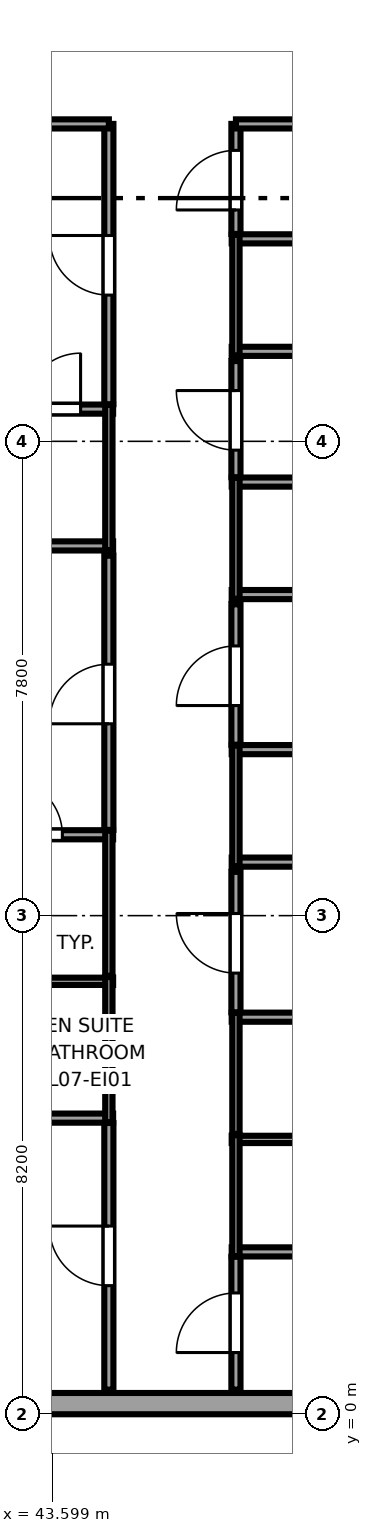
"""IFC4 building model, lengths in metres.
Left out: names, types, materials, properties, quantities, classifications, styles, units other than length and angle.
Written with IfcOpenShell. Run it as: python <this file> out.ifc"""

import sys

from ifc_helpers import new_model, si_unit, direction, frame, frame_2d, origin, place, context, subcontext, project, spatial, rectangle, extrude, source, transform, mapped, element, fill, save


model = new_model("IFC4")
c1 = context("Model", 3, precision=1e-05, world=origin(), true_north=direction((0.0, 1.0)))
c2 = subcontext(c1, "Body", "Model", "MODEL_VIEW")
j1 = project(units=[si_unit("LENGTHUNIT", "METRE"), si_unit("PLANEANGLEUNIT", "RADIAN")], contexts=[c1])
p1 = place(None, origin())
s1 = spatial("IfcSite", under=j1, at=p1, CompositionType="ELEMENT")
p2 = place(p1, origin())
s2 = spatial("IfcBuilding", under=s1, at=p2, CompositionType="ELEMENT")
p3 = place(p2, frame((0.0, 0.0, 35.55)))
s3 = spatial("IfcBuildingStorey", under=s2, at=p3, CompositionType="ELEMENT", Elevation=35.55)
p4 = place(p3, frame((34.375, 0.175, 0.0), z_axis=(0.0, 0.0, 1.0), x_axis=(1.0, 0.0, 0.0)))
e1 = element("IfcWall", 1, at=p4, inside=s3, PredefinedType="SOLIDWALL", context=c2, shape_type="SweptSolid", body=[
    extrude(rectangle(XDim=18.008, YDim=0.35, at=frame_2d((9.004, 0.0))), origin(), (0.0, 0.0, 1.0), 3.37),
])
p5 = place(p4, frame((1.726, 0.0, 0.68)))
e2 = element("IfcOpeningElement", 2, at=p5, cuts=e1, PredefinedType="OPENING", context=c2, shape_type="SweptSolid", body=[
    extrude(rectangle(XDim=1.95, YDim=1.82, at=frame_2d((0.975, 0.91))), frame((0.0, 0.185, 0.0), z_axis=(0.0, -1.0, 0.0), x_axis=(1.0, 0.0, 0.0)), (0.0, 0.0, 1.0), 0.37),
])
p6 = place(p4, frame((15.725, 0.0, 0.62)))
e3 = element("IfcOpeningElement", 3, at=p6, cuts=e1, PredefinedType="OPENING", context=c2, shape_type="SweptSolid", body=[
    extrude(rectangle(XDim=1.5, YDim=1.55, at=frame_2d((0.75, 0.775))), frame((0.0, 0.185, 0.0), z_axis=(0.0, -1.0, 0.0), x_axis=(1.0, 0.0, 0.0)), (0.0, 0.0, 1.0), 0.37),
])
p7 = place(p3, frame((42.01, 4.87, 0.0), z_axis=(0.0, 0.0, 1.0), x_axis=(1.0, 0.0, 0.0)))
e4 = element("IfcWall", 4, at=p7, inside=s3, PredefinedType="PARTITIONING", context=c2, shape_type="SweptSolid", body=[
    extrude(rectangle(XDim=2.59, YDim=0.15, at=frame_2d((1.295, 0.0))), origin(), (0.0, 0.0, 1.0), 3.37),
])
p8 = place(p3, frame((42.01, 7.12, 0.0), z_axis=(0.0, 0.0, 1.0), x_axis=(1.0, 0.0, 0.0)))
e5 = element("IfcWall", 5, at=p8, inside=s3, PredefinedType="PLUMBINGWALL", context=c2, shape_type="SweptSolid", body=[
    extrude(rectangle(XDim=2.59, YDim=0.12, at=frame_2d((1.295, 0.0))), origin(), (0.0, 0.0, 1.0), 3.37),
])
p9 = place(p3, frame((44.53, 4.8, 0.0), z_axis=(0.0, 0.0, 1.0), x_axis=(0.0, 1.0, 0.0)))
e6 = element("IfcWall", 6, at=p9, inside=s3, PredefinedType="PLUMBINGWALL", context=c2, shape_type="SweptSolid", body=[
    extrude(rectangle(XDim=2.39, YDim=0.12, at=frame_2d((1.195, 0.0))), origin(), (0.0, 0.0, 1.0), 3.37),
])
p10 = place(p3, frame((42.01, 9.53, 0.0), z_axis=(0.0, 0.0, 1.0), x_axis=(1.0, 0.0, 0.0)))
e7 = element("IfcWall", 7, at=p10, inside=s3, PredefinedType="PARTITIONING", context=c2, shape_type="SweptSolid", body=[
    extrude(rectangle(XDim=2.59, YDim=0.15, at=frame_2d((1.295, 0.0))), origin(), (0.0, 0.0, 1.0), 3.37),
])
p11 = place(p10, frame((0.835, 0.0, 0.0)))
e8 = element("IfcOpeningElement", 8, at=p11, cuts=e7, PredefinedType="OPENING", context=c2, shape_type="SweptSolid", body=[
    extrude(rectangle(XDim=0.92, YDim=2.01, at=frame_2d((0.46, 1.005))), frame((0.0, 0.085, 0.0), z_axis=(0.0, -1.0, 0.0), x_axis=(1.0, 0.0, 0.0)), (0.0, 0.0, 1.0), 0.17),
])
p12 = place(p3, frame((44.53, 7.21, 0.0), z_axis=(0.0, 0.0, 1.0), x_axis=(0.0, 1.0, 0.0)))
e9 = element("IfcWall", 9, at=p12, inside=s3, PredefinedType="PLUMBINGWALL", context=c2, shape_type="SweptSolid", body=[
    extrude(rectangle(XDim=2.39, YDim=0.12, at=frame_2d((1.195, 0.0))), origin(), (0.0, 0.0, 1.0), 3.37),
])
p13 = place(p3, frame((34.65, 14.28, 0.0), z_axis=(0.0, 0.0, 1.0), x_axis=(1.0, 0.0, 0.0)))
e10 = element("IfcWall", 10, at=p13, inside=s3, PredefinedType="PARTITIONING", context=c2, shape_type="SweptSolid", body=[
    extrude(rectangle(XDim=9.95, YDim=0.15, at=frame_2d((4.975, 0.0))), origin(), (0.0, 0.0, 1.0), 3.37),
])
p14 = place(p3, frame((42.01, 16.53, 0.0), z_axis=(0.0, 0.0, 1.0), x_axis=(1.0, 0.0, 0.0)))
e11 = element("IfcWall", 11, at=p14, inside=s3, PredefinedType="PARTITIONING", context=c2, shape_type="SweptSolid", body=[
    extrude(rectangle(XDim=2.59, YDim=0.15, at=frame_2d((1.295, 0.0))), origin(), (0.0, 0.0, 1.0), 3.37),
])
p15 = place(p14, frame((1.135, 0.0, 0.0)))
e12 = element("IfcOpeningElement", 12, at=p15, cuts=e11, PredefinedType="OPENING", context=c2, shape_type="SweptSolid", body=[
    extrude(rectangle(XDim=0.92, YDim=2.01, at=frame_2d((0.46, 1.005))), frame((0.0, 0.085, 0.0), z_axis=(0.0, -1.0, 0.0), x_axis=(1.0, 0.0, 0.0)), (0.0, 0.0, 1.0), 0.17),
])
p16 = place(p3, frame((44.53, 14.21, 0.0), z_axis=(0.0, 0.0, 1.0), x_axis=(0.0, 1.0, 0.0)))
e13 = element("IfcWall", 13, at=p16, inside=s3, PredefinedType="PLUMBINGWALL", context=c2, shape_type="SweptSolid", body=[
    extrude(rectangle(XDim=2.39, YDim=0.12, at=frame_2d((1.195, 0.0))), origin(), (0.0, 0.0, 1.0), 3.37),
])
p17 = place(p3, frame((46.55, 2.67, 0.0), z_axis=(0.0, 0.0, 1.0), x_axis=(1.0, 0.0, 0.0)))
e14 = element("IfcWall", 14, at=p17, inside=s3, PredefinedType="PARTITIONING", context=c2, shape_type="SweptSolid", body=[
    extrude(rectangle(XDim=2.59, YDim=0.15, at=frame_2d((1.295, 0.0))), origin(), (0.0, 0.0, 1.0), 3.37),
])
p18 = place(p3, frame((46.55, 4.52, 0.0), z_axis=(0.0, 0.0, 1.0), x_axis=(1.0, 0.0, 0.0)))
e15 = element("IfcWall", 15, at=p18, inside=s3, PredefinedType="PLUMBINGWALL", context=c2, shape_type="SweptSolid", body=[
    extrude(rectangle(XDim=2.59, YDim=0.12, at=frame_2d((1.295, 0.0))), origin(), (0.0, 0.0, 1.0), 3.37),
])
p19 = place(p3, frame((46.62, 2.6, 0.0), z_axis=(0.0, 0.0, 1.0), x_axis=(0.0, 1.0, 0.0)))
e16 = element("IfcWall", 16, at=p19, inside=s3, PredefinedType="PLUMBINGWALL", context=c2, shape_type="SweptSolid", body=[
    extrude(rectangle(XDim=1.99, YDim=0.12, at=frame_2d((0.995, 0.0))), origin(), (0.0, 0.0, 1.0), 3.37),
])
p20 = place(p3, frame((46.55, 6.53, 0.0), z_axis=(0.0, 0.0, 1.0), x_axis=(1.0, 0.0, 0.0)))
e17 = element("IfcWall", 17, at=p20, inside=s3, PredefinedType="PARTITIONING", context=c2, shape_type="SweptSolid", body=[
    extrude(rectangle(XDim=2.59, YDim=0.15, at=frame_2d((1.295, 0.0))), origin(), (0.0, 0.0, 1.0), 3.37),
])
p21 = place(p3, frame((46.62, 4.61, 0.0), z_axis=(0.0, 0.0, 1.0), x_axis=(0.0, 1.0, 0.0)))
e18 = element("IfcWall", 18, at=p21, inside=s3, PredefinedType="PLUMBINGWALL", context=c2, shape_type="SweptSolid", body=[
    extrude(rectangle(XDim=1.99, YDim=0.12, at=frame_2d((0.995, 0.0))), origin(), (0.0, 0.0, 1.0), 3.37),
])
p22 = place(p3, frame((46.55, 9.08, 0.0), z_axis=(0.0, 0.0, 1.0), x_axis=(1.0, 0.0, 0.0)))
e19 = element("IfcWall", 19, at=p22, inside=s3, PredefinedType="PARTITIONING", context=c2, shape_type="SweptSolid", body=[
    extrude(rectangle(XDim=10.045, YDim=0.15, at=frame_2d((5.022, 0.0))), origin(), (0.0, 0.0, 1.0), 3.37),
])
p23 = place(p3, frame((46.55, 10.93, 0.0), z_axis=(0.0, 0.0, 1.0), x_axis=(1.0, 0.0, 0.0)))
e20 = element("IfcWall", 20, at=p23, inside=s3, PredefinedType="PARTITIONING", context=c2, shape_type="SweptSolid", body=[
    extrude(rectangle(XDim=2.59, YDim=0.15, at=frame_2d((1.295, 0.0))), origin(), (0.0, 0.0, 1.0), 3.37),
])
p24 = place(p3, frame((46.62, 9.01, 0.0), z_axis=(0.0, 0.0, 1.0), x_axis=(0.0, 1.0, 0.0)))
e21 = element("IfcWall", 21, at=p24, inside=s3, PredefinedType="PLUMBINGWALL", context=c2, shape_type="SweptSolid", body=[
    extrude(rectangle(XDim=1.99, YDim=0.12, at=frame_2d((0.995, 0.0))), origin(), (0.0, 0.0, 1.0), 3.37),
])
p25 = place(p3, frame((46.55, 13.48, 0.0), z_axis=(0.0, 0.0, 1.0), x_axis=(1.0, 0.0, 0.0)))
e22 = element("IfcWall", 22, at=p25, inside=s3, PredefinedType="PARTITIONING", context=c2, shape_type="SweptSolid", body=[
    extrude(rectangle(XDim=10.045, YDim=0.15, at=frame_2d((5.022, 0.0))), origin(), (0.0, 0.0, 1.0), 3.37),
])
p26 = place(p3, frame((46.55, 15.33, 0.0), z_axis=(0.0, 0.0, 1.0), x_axis=(1.0, 0.0, 0.0)))
e23 = element("IfcWall", 23, at=p26, inside=s3, PredefinedType="PARTITIONING", context=c2, shape_type="SweptSolid", body=[
    extrude(rectangle(XDim=2.59, YDim=0.15, at=frame_2d((1.295, 0.0))), origin(), (0.0, 0.0, 1.0), 3.37),
])
p27 = place(p3, frame((46.62, 13.41, 0.0), z_axis=(0.0, 0.0, 1.0), x_axis=(0.0, 1.0, 0.0)))
e24 = element("IfcWall", 24, at=p27, inside=s3, PredefinedType="PLUMBINGWALL", context=c2, shape_type="SweptSolid", body=[
    extrude(rectangle(XDim=1.99, YDim=0.12, at=frame_2d((0.995, 0.0))), origin(), (0.0, 0.0, 1.0), 3.37),
])
p28 = place(p3, frame((46.55, 17.48, 0.0), z_axis=(0.0, 0.0, 1.0), x_axis=(1.0, 0.0, 0.0)))
e25 = element("IfcWall", 25, at=p28, inside=s3, PredefinedType="PARTITIONING", context=c2, shape_type="SweptSolid", body=[
    extrude(rectangle(XDim=10.045, YDim=0.15, at=frame_2d((5.022, 0.0))), origin(), (0.0, 0.0, 1.0), 3.37),
])
p29 = place(p3, frame((46.55, 19.33, 0.0), z_axis=(0.0, 0.0, 1.0), x_axis=(1.0, 0.0, 0.0)))
e26 = element("IfcWall", 26, at=p29, inside=s3, PredefinedType="PARTITIONING", context=c2, shape_type="SweptSolid", body=[
    extrude(rectangle(XDim=2.59, YDim=0.15, at=frame_2d((1.295, 0.0))), origin(), (0.0, 0.0, 1.0), 3.37),
])
p30 = place(p3, frame((46.62, 17.41, 0.0), z_axis=(0.0, 0.0, 1.0), x_axis=(0.0, 1.0, 0.0)))
e27 = element("IfcWall", 27, at=p30, inside=s3, PredefinedType="PLUMBINGWALL", context=c2, shape_type="SweptSolid", body=[
    extrude(rectangle(XDim=1.99, YDim=0.12, at=frame_2d((0.995, 0.0))), origin(), (0.0, 0.0, 1.0), 3.37),
])
p31 = place(p3, frame((44.53, 0.405, 0.0), z_axis=(0.0, 0.0, 1.0), x_axis=(0.0, 1.0, 0.0)))
e28 = element("IfcWall", 28, at=p31, inside=s3, PredefinedType="PARTITIONING", context=c2, shape_type="SweptSolid", body=[
    extrude(rectangle(XDim=4.385, YDim=0.15, at=frame_2d((2.192, 0.0))), origin(), (0.0, 0.0, 1.0), 3.37),
])
p32 = place(p31, frame((1.71, 0.0, 0.0)))
e29 = element("IfcOpeningElement", 29, at=p32, cuts=e28, PredefinedType="OPENING", context=c2, shape_type="SweptSolid", body=[
    extrude(rectangle(XDim=0.98, YDim=2.12, at=frame_2d((0.49, 1.06))), frame((0.0, 0.085, 0.0), z_axis=(0.0, -1.0, 0.0), x_axis=(1.0, 0.0, 0.0)), (0.0, 0.0, 1.0), 0.17),
])
p33 = place(p3, frame((44.53, 9.61, 0.0), z_axis=(0.0, 0.0, 1.0), x_axis=(0.0, 1.0, 0.0)))
e30 = element("IfcWall", 30, at=p33, inside=s3, PredefinedType="PARTITIONING", context=c2, shape_type="SweptSolid", body=[
    extrude(rectangle(XDim=4.51, YDim=0.15, at=frame_2d((2.255, 0.0))), origin(), (0.0, 0.0, 1.0), 3.37),
])
p34 = place(p33, frame((1.745, 0.0, 0.0)))
e31 = element("IfcOpeningElement", 31, at=p34, cuts=e30, PredefinedType="OPENING", context=c2, shape_type="SweptSolid", body=[
    extrude(rectangle(XDim=0.98, YDim=2.12, at=frame_2d((0.49, 1.06))), frame((0.0, 0.085, 0.0), z_axis=(0.0, -1.0, 0.0), x_axis=(1.0, 0.0, 0.0)), (0.0, 0.0, 1.0), 0.17),
])
p35 = place(p3, frame((44.53, 16.61, 0.0), z_axis=(0.0, 0.0, 1.0), x_axis=(0.0, 1.0, 0.0)))
e32 = element("IfcWall", 32, at=p35, inside=s3, PredefinedType="PARTITIONING", context=c2, shape_type="SweptSolid", body=[
    extrude(rectangle(XDim=4.61, YDim=0.15, at=frame_2d((2.305, 0.0))), origin(), (0.0, 0.0, 1.0), 3.37),
])
p36 = place(p35, frame((1.795, 0.0, 0.0)))
e33 = element("IfcOpeningElement", 33, at=p36, cuts=e32, PredefinedType="OPENING", context=c2, shape_type="SweptSolid", body=[
    extrude(rectangle(XDim=0.98, YDim=2.12, at=frame_2d((0.49, 1.06))), frame((0.0, 0.085, 0.0), z_axis=(0.0, -1.0, 0.0), x_axis=(1.0, 0.0, 0.0)), (0.0, 0.0, 1.0), 0.17),
])
p37 = place(p3, frame((34.65, 21.22, 0.0), z_axis=(0.0, 0.0, 1.0), x_axis=(1.0, 0.0, 0.0)))
e34 = element("IfcWall", 34, at=p37, inside=s3, PredefinedType="PARTITIONING", context=c2, shape_type="SweptSolid", body=[
    extrude(rectangle(XDim=9.88, YDim=0.15, at=frame_2d((4.94, 0.0))), origin(), (0.0, 0.0, 1.0), 3.37),
])
p38 = place(p3, frame((46.62, 0.405, 0.0), z_axis=(0.0, 0.0, 1.0), x_axis=(0.0, 1.0, 0.0)))
e35 = element("IfcWall", 35, at=p38, inside=s3, PredefinedType="PARTITIONING", context=c2, shape_type="SweptSolid", body=[
    extrude(rectangle(XDim=2.185, YDim=0.15, at=frame_2d((1.093, 0.0))), origin(), (0.0, 0.0, 1.0), 3.37),
])
p39 = place(p38, frame((0.61, 0.0, 0.0)))
e36 = element("IfcOpeningElement", 36, at=p39, cuts=e35, PredefinedType="OPENING", context=c2, shape_type="SweptSolid", body=[
    extrude(rectangle(XDim=0.98, YDim=2.12, at=frame_2d((0.49, 1.06))), frame((0.0, 0.085, 0.0), z_axis=(0.0, -1.0, 0.0), x_axis=(1.0, 0.0, 0.0)), (0.0, 0.0, 1.0), 0.17),
])
p40 = place(p3, frame((46.62, 6.61, 0.0), z_axis=(0.0, 0.0, 1.0), x_axis=(0.0, 1.0, 0.0)))
e37 = element("IfcWall", 37, at=p40, inside=s3, PredefinedType="PARTITIONING", context=c2, shape_type="SweptSolid", body=[
    extrude(rectangle(XDim=2.31, YDim=0.15, at=frame_2d((1.155, 0.0))), origin(), (0.0, 0.0, 1.0), 3.37),
])
p41 = place(p40, frame((0.645, 0.0, 0.0)))
e38 = element("IfcOpeningElement", 38, at=p41, cuts=e37, PredefinedType="OPENING", context=c2, shape_type="SweptSolid", body=[
    extrude(rectangle(XDim=0.98, YDim=2.12, at=frame_2d((0.49, 1.06))), frame((0.0, 0.085, 0.0), z_axis=(0.0, -1.0, 0.0), x_axis=(1.0, 0.0, 0.0)), (0.0, 0.0, 1.0), 0.17),
])
p42 = place(p3, frame((46.62, 11.01, 0.0), z_axis=(0.0, 0.0, 1.0), x_axis=(0.0, 1.0, 0.0)))
e39 = element("IfcWall", 39, at=p42, inside=s3, PredefinedType="PARTITIONING", context=c2, shape_type="SweptSolid", body=[
    extrude(rectangle(XDim=2.31, YDim=0.15, at=frame_2d((1.155, 0.0))), origin(), (0.0, 0.0, 1.0), 3.37),
])
p43 = place(p42, frame((0.645, 0.0, 0.0)))
e40 = element("IfcOpeningElement", 40, at=p43, cuts=e39, PredefinedType="OPENING", context=c2, shape_type="SweptSolid", body=[
    extrude(rectangle(XDim=0.98, YDim=2.12, at=frame_2d((0.49, 1.06))), frame((0.0, 0.085, 0.0), z_axis=(0.0, -1.0, 0.0), x_axis=(1.0, 0.0, 0.0)), (0.0, 0.0, 1.0), 0.17),
])
p44 = place(p3, frame((46.62, 15.41, 0.0), z_axis=(0.0, 0.0, 1.0), x_axis=(0.0, 1.0, 0.0)))
e41 = element("IfcWall", 41, at=p44, inside=s3, PredefinedType="PARTITIONING", context=c2, shape_type="SweptSolid", body=[
    extrude(rectangle(XDim=1.91, YDim=0.15, at=frame_2d((0.955, 0.0))), origin(), (0.0, 0.0, 1.0), 3.37),
])
p45 = place(p44, frame((0.445, 0.0, 0.0)))
e42 = element("IfcOpeningElement", 42, at=p45, cuts=e41, PredefinedType="OPENING", context=c2, shape_type="SweptSolid", body=[
    extrude(rectangle(XDim=0.98, YDim=2.12, at=frame_2d((0.49, 1.06))), frame((0.0, 0.085, 0.0), z_axis=(0.0, -1.0, 0.0), x_axis=(1.0, 0.0, 0.0)), (0.0, 0.0, 1.0), 0.17),
])
p46 = place(p3, frame((46.62, 19.41, 0.0), z_axis=(0.0, 0.0, 1.0), x_axis=(0.0, 1.0, 0.0)))
e43 = element("IfcWall", 43, at=p46, inside=s3, PredefinedType="PARTITIONING", context=c2, shape_type="SweptSolid", body=[
    extrude(rectangle(XDim=1.81, YDim=0.15, at=frame_2d((0.905, 0.0))), origin(), (0.0, 0.0, 1.0), 3.37),
])
p47 = place(p46, frame((0.395, 0.0, 0.0)))
e44 = element("IfcOpeningElement", 44, at=p47, cuts=e43, PredefinedType="OPENING", context=c2, shape_type="SweptSolid", body=[
    extrude(rectangle(XDim=0.98, YDim=2.12, at=frame_2d((0.49, 1.06))), frame((0.0, 0.085, 0.0), z_axis=(0.0, -1.0, 0.0), x_axis=(1.0, 0.0, 0.0)), (0.0, 0.0, 1.0), 0.17),
])
p48 = place(p3, frame((46.62, 21.22, 0.0), z_axis=(0.0, 0.0, 1.0), x_axis=(1.0, 0.0, 0.0)))
e45 = element("IfcWall", 45, at=p48, inside=s3, PredefinedType="PARTITIONING", context=c2, shape_type="SweptSolid", body=[
    extrude(rectangle(XDim=9.975, YDim=0.15, at=frame_2d((4.987, 0.0))), origin(), (0.0, 0.0, 1.0), 3.37),
])
m1 = source(origin(), c2, "Body", "SweptSolid", [
    extrude(rectangle(XDim=0.92, YDim=2.01, at=frame_2d((0.46, 1.005))), frame((0.0, 0.025, 0.0), z_axis=(0.0, -1.0, 0.0), x_axis=(1.0, 0.0, 0.0)), (0.0, 0.0, 1.0), 0.05),
])
p49 = place(p11, origin())
e46 = element("IfcDoor", 46, at=p49, inside=s3, OperationType="SINGLE_SWING_LEFT", PredefinedType="DOOR", context=c2, shape_type="MappedRepresentation", body=[
    mapped(m1, transform((0.0, 0.0, 0.0), x_axis=(1.0, 0.0, 0.0), y_axis=(0.0, 1.0, 0.0), z_axis=(0.0, 0.0, 1.0), scale=1.0)),
])
fill(e8, e46)
p50 = place(p15, origin())
e47 = element("IfcDoor", 47, at=p50, inside=s3, OperationType="SINGLE_SWING_RIGHT", PredefinedType="DOOR", context=c2, shape_type="MappedRepresentation", body=[
    mapped(m1, transform((0.0, 0.0, 0.0), x_axis=(1.0, 0.0, 0.0), y_axis=(0.0, 1.0, 0.0), z_axis=(0.0, 0.0, 1.0), scale=1.0)),
])
fill(e12, e47)
m2 = source(origin(), c2, "Body", "SweptSolid", [
    extrude(rectangle(XDim=0.98, YDim=2.12, at=frame_2d((0.49, 1.06))), frame((0.0, 0.025, 0.0), z_axis=(0.0, -1.0, 0.0), x_axis=(1.0, 0.0, 0.0)), (0.0, 0.0, 1.0), 0.05),
])
p51 = place(p32, origin())
e48 = element("IfcDoor", 48, at=p51, inside=s3, OperationType="SINGLE_SWING_RIGHT", PredefinedType="DOOR", context=c2, shape_type="MappedRepresentation", body=[
    mapped(m2, transform((0.0, 0.0, 0.0), x_axis=(1.0, 0.0, 0.0), y_axis=(0.0, 1.0, 0.0), z_axis=(0.0, 0.0, 1.0), scale=1.0)),
])
fill(e29, e48)
p52 = place(p34, origin())
e49 = element("IfcDoor", 49, at=p52, inside=s3, OperationType="SINGLE_SWING_LEFT", PredefinedType="DOOR", context=c2, shape_type="MappedRepresentation", body=[
    mapped(m2, transform((0.0, 0.0, 0.0), x_axis=(1.0, 0.0, 0.0), y_axis=(0.0, 1.0, 0.0), z_axis=(0.0, 0.0, 1.0), scale=1.0)),
])
fill(e31, e49)
p53 = place(p36, origin())
e50 = element("IfcDoor", 50, at=p53, inside=s3, OperationType="SINGLE_SWING_RIGHT", PredefinedType="DOOR", context=c2, shape_type="MappedRepresentation", body=[
    mapped(m2, transform((0.0, 0.0, 0.0), x_axis=(1.0, 0.0, 0.0), y_axis=(0.0, 1.0, 0.0), z_axis=(0.0, 0.0, 1.0), scale=1.0)),
])
fill(e33, e50)
p54 = place(p39, origin())
e51 = element("IfcDoor", 51, at=p54, inside=s3, OperationType="SINGLE_SWING_LEFT", PredefinedType="DOOR", context=c2, shape_type="MappedRepresentation", body=[
    mapped(m2, transform((0.0, 0.0, 0.0), x_axis=(1.0, 0.0, 0.0), y_axis=(0.0, 1.0, 0.0), z_axis=(0.0, 0.0, 1.0), scale=1.0)),
])
fill(e36, e51)
p55 = place(p41, origin())
e52 = element("IfcDoor", 52, at=p55, inside=s3, OperationType="SINGLE_SWING_RIGHT", PredefinedType="DOOR", context=c2, shape_type="MappedRepresentation", body=[
    mapped(m2, transform((0.0, 0.0, 0.0), x_axis=(1.0, 0.0, 0.0), y_axis=(0.0, 1.0, 0.0), z_axis=(0.0, 0.0, 1.0), scale=1.0)),
])
fill(e38, e52)
p56 = place(p43, origin())
e53 = element("IfcDoor", 53, at=p56, inside=s3, OperationType="SINGLE_SWING_LEFT", PredefinedType="DOOR", context=c2, shape_type="MappedRepresentation", body=[
    mapped(m2, transform((0.0, 0.0, 0.0), x_axis=(1.0, 0.0, 0.0), y_axis=(0.0, 1.0, 0.0), z_axis=(0.0, 0.0, 1.0), scale=1.0)),
])
fill(e40, e53)
p57 = place(p45, origin())
e54 = element("IfcDoor", 54, at=p57, inside=s3, OperationType="SINGLE_SWING_RIGHT", PredefinedType="DOOR", context=c2, shape_type="MappedRepresentation", body=[
    mapped(m2, transform((0.0, 0.0, 0.0), x_axis=(1.0, 0.0, 0.0), y_axis=(0.0, 1.0, 0.0), z_axis=(0.0, 0.0, 1.0), scale=1.0)),
])
fill(e42, e54)
p58 = place(p47, origin())
e55 = element("IfcDoor", 55, at=p58, inside=s3, OperationType="SINGLE_SWING_LEFT", PredefinedType="DOOR", context=c2, shape_type="MappedRepresentation", body=[
    mapped(m2, transform((0.0, 0.0, 0.0), x_axis=(1.0, 0.0, 0.0), y_axis=(0.0, 1.0, 0.0), z_axis=(0.0, 0.0, 1.0), scale=1.0)),
])
fill(e44, e55)
save(model, sys.argv[1])
